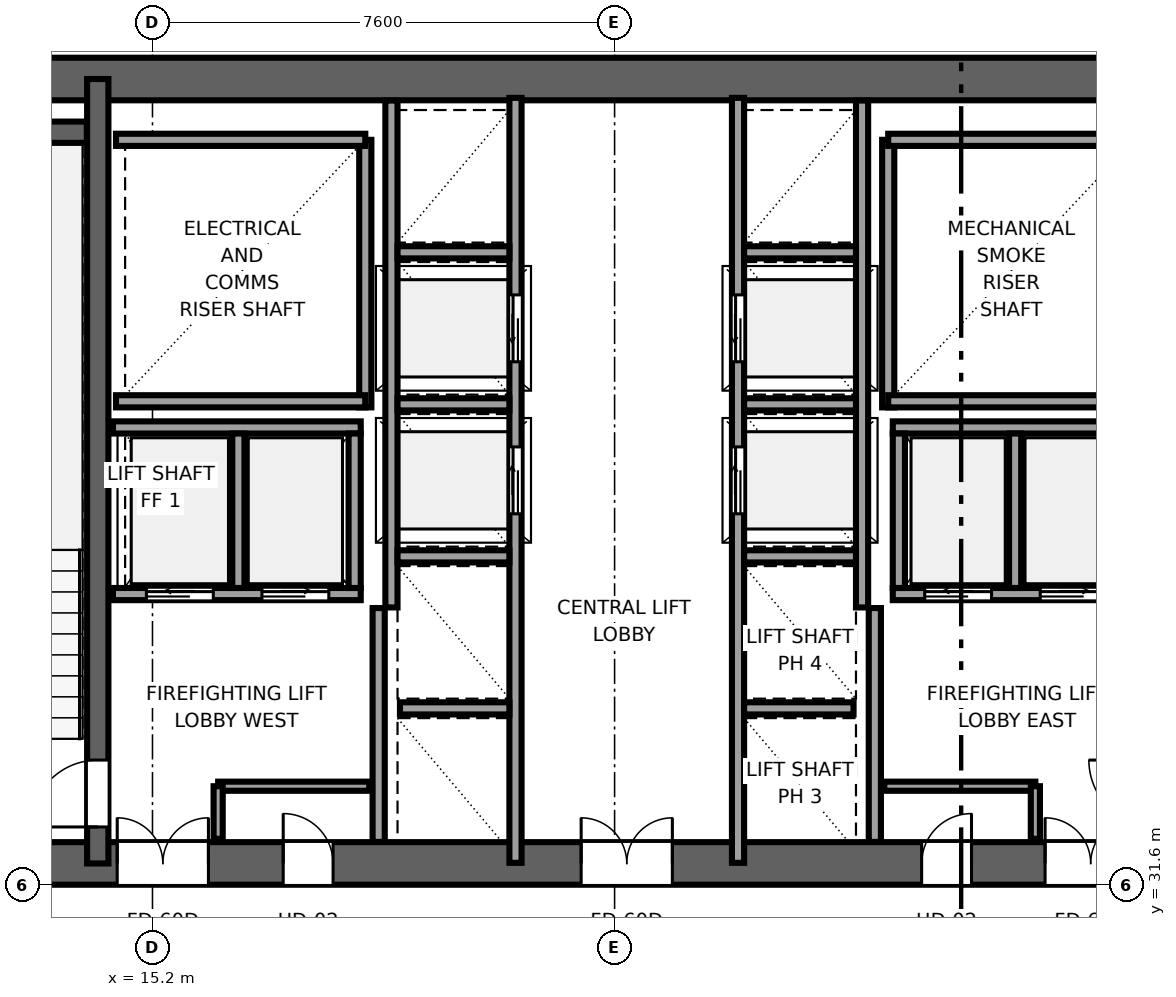
"""IFC4 building model, lengths in metres.
Left out: names, types, materials, properties, quantities, classifications, styles, units other than length and angle.
Written with IfcOpenShell. Run it as: python <this file> out.ifc"""

import sys

from ifc_helpers import new_model, si_unit, direction, frame, frame_2d, origin, place, context, subcontext, project, spatial, rectangle, extrude, source, transform, mapped, element, fill, save


model = new_model("IFC4")
c1 = context("Model", 3, precision=1e-05, world=origin(), true_north=direction((0.0, 1.0)))
c2 = subcontext(c1, "Body", "Model", "MODEL_VIEW")
j1 = project(units=[si_unit("LENGTHUNIT", "METRE"), si_unit("PLANEANGLEUNIT", "RADIAN")], contexts=[c1])
p1 = place(None, origin())
s1 = spatial("IfcSite", under=j1, at=p1, CompositionType="ELEMENT")
p2 = place(p1, origin())
s2 = spatial("IfcBuilding", under=s1, at=p2, CompositionType="ELEMENT")
p3 = place(p2, frame((0.0, 0.0, 125.75)))
s3 = spatial("IfcBuildingStorey", under=s2, at=p3, CompositionType="ELEMENT", Elevation=125.75)
p4 = place(p3, frame((9.8, 31.95, 0.0), z_axis=(0.0, 0.0, 1.0), x_axis=(1.0, 0.0, 0.0)))
e1 = element("IfcWall", 1, at=p4, inside=s3, PredefinedType="SHEAR", context=c2, shape_type="SweptSolid", body=[
    extrude(rectangle(XDim=26.4, YDim=0.7, at=frame_2d((13.2, 0.0))), origin(), (0.0, 0.0, 1.0), 3.55),
])
p5 = place(p4, frame((6.32, 0.0, 0.0), z_axis=(0.0, 0.0, 1.0), x_axis=(-1.0, 0.0, 0.0)))
e2 = element("IfcOpeningElement", 2, at=p5, cuts=e1, PredefinedType="OPENING", context=c2, shape_type="SweptSolid", body=[
    extrude(rectangle(XDim=1.5, YDim=2.04, at=frame_2d((0.75, 1.02))), frame((0.0, 0.36, 0.0), z_axis=(0.0, -1.0, 0.0), x_axis=(1.0, 0.0, 0.0)), (0.0, 0.0, 1.0), 0.72),
])
p6 = place(p4, frame((13.95, 0.0, 0.0), z_axis=(0.0, 0.0, 1.0), x_axis=(-1.0, 0.0, 0.0)))
e3 = element("IfcOpeningElement", 3, at=p6, cuts=e1, PredefinedType="OPENING", context=c2, shape_type="SweptSolid", body=[
    extrude(rectangle(XDim=1.5, YDim=2.04, at=frame_2d((0.75, 1.02))), frame((0.0, 0.36, 0.0), z_axis=(0.0, -1.0, 0.0), x_axis=(1.0, 0.0, 0.0)), (0.0, 0.0, 1.0), 0.72),
])
p7 = place(p4, frame((21.58, 0.0, 0.0), z_axis=(0.0, 0.0, 1.0), x_axis=(-1.0, 0.0, 0.0)))
e4 = element("IfcOpeningElement", 4, at=p7, cuts=e1, PredefinedType="OPENING", context=c2, shape_type="SweptSolid", body=[
    extrude(rectangle(XDim=1.5, YDim=2.04, at=frame_2d((0.75, 1.02))), frame((0.0, 0.36, 0.0), z_axis=(0.0, -1.0, 0.0), x_axis=(1.0, 0.0, 0.0)), (0.0, 0.0, 1.0), 0.72),
])
p8 = place(p4, frame((8.37, 0.0, 0.0), z_axis=(0.0, 0.0, 1.0), x_axis=(-1.0, 0.0, 0.0)))
e5 = element("IfcOpeningElement", 5, at=p8, cuts=e1, PredefinedType="OPENING", context=c2, shape_type="SweptSolid", body=[
    extrude(rectangle(XDim=0.82, YDim=2.01, at=frame_2d((0.41, 1.005))), frame((0.0, 0.36, 0.0), z_axis=(0.0, -1.0, 0.0), x_axis=(1.0, 0.0, 0.0)), (0.0, 0.0, 1.0), 0.72),
])
p9 = place(p4, frame((18.87, 0.0, 0.0), z_axis=(0.0, 0.0, 1.0), x_axis=(-1.0, 0.0, 0.0)))
e6 = element("IfcOpeningElement", 6, at=p9, cuts=e1, PredefinedType="OPENING", context=c2, shape_type="SweptSolid", body=[
    extrude(rectangle(XDim=0.82, YDim=2.01, at=frame_2d((0.41, 1.005))), frame((0.0, 0.36, 0.0), z_axis=(0.0, -1.0, 0.0), x_axis=(1.0, 0.0, 0.0)), (0.0, 0.0, 1.0), 0.72),
])
p10 = place(p3, frame((9.8, 44.85, 0.0), z_axis=(0.0, 0.0, 1.0), x_axis=(1.0, 0.0, 0.0)))
e7 = element("IfcWall", 7, at=p10, inside=s3, PredefinedType="SHEAR", context=c2, shape_type="SweptSolid", body=[
    extrude(rectangle(XDim=26.4, YDim=0.7, at=frame_2d((13.2, 0.0))), origin(), (0.0, 0.0, 1.0), 3.55),
])
p11 = place(p3, frame((14.3, 31.95, 0.0), z_axis=(0.0, 0.0, 1.0), x_axis=(0.0, 1.0, 0.0)))
e8 = element("IfcWall", 8, at=p11, inside=s3, PredefinedType="SHEAR", context=c2, shape_type="SweptSolid", body=[
    extrude(rectangle(XDim=12.9, YDim=0.35, at=frame_2d((6.45, 0.0))), origin(), (0.0, 0.0, 1.0), 3.55),
])
p12 = place(p11, frame((0.6, 0.0, 0.0)))
e9 = element("IfcOpeningElement", 9, at=p12, cuts=e8, PredefinedType="OPENING", context=c2, shape_type="SweptSolid", body=[
    extrude(rectangle(XDim=1.1, YDim=2.12, at=frame_2d((0.55, 1.06))), frame((0.0, 0.185, 0.0), z_axis=(0.0, -1.0, 0.0), x_axis=(1.0, 0.0, 0.0)), (0.0, 0.0, 1.0), 0.37),
])
p13 = place(p3, frame((10.52, 43.975, 0.0), z_axis=(0.0, 0.0, 1.0), x_axis=(1.0, 0.0, 0.0)))
e10 = element("IfcWall", 10, at=p13, inside=s3, PredefinedType="SHEAR", context=c2, shape_type="SweptSolid", body=[
    extrude(rectangle(XDim=3.6, YDim=0.35, at=frame_2d((1.8, 0.0))), origin(), (0.0, 0.0, 1.0), 3.55),
])
p14 = place(p3, frame((18.7, 39.45, 0.0), z_axis=(0.0, 0.0, 1.0), x_axis=(0.0, 1.0, 0.0)))
e11 = element("IfcWall", 11, at=p14, inside=s3, PredefinedType="SOLIDWALL", context=c2, shape_type="SweptSolid", body=[
    extrude(rectangle(XDim=4.4, YDim=0.2, at=frame_2d((2.2, 0.0))), origin(), (0.0, 0.0, 1.0), 3.37),
])
for number, where, z_axis, x_axis in (
    (12, (14.6, 39.55, 0.0), (0.0, 0.0, 1.0), (1.0, 0.0, 0.0)),
    (13, (14.6, 43.85, 0.0), (0.0, 0.0, 1.0), (1.0, 0.0, 0.0)),
):
    element("IfcWall", number, at=place(p3, frame(where, z_axis=z_axis, x_axis=x_axis)), inside=s3, PredefinedType="SOLIDWALL", context=c2, shape_type="SweptSolid", body=[
        extrude(rectangle(XDim=4.1, YDim=0.2, at=frame_2d((2.05, 0.0))), origin(), (0.0, 0.0, 1.0), 3.37),
    ])
p15 = place(p3, frame((27.3, 39.45, 0.0), z_axis=(0.0, 0.0, 1.0), x_axis=(0.0, 1.0, 0.0)))
e14 = element("IfcWall", 14, at=p15, inside=s3, PredefinedType="SOLIDWALL", context=c2, shape_type="SweptSolid", body=[
    extrude(rectangle(XDim=4.4, YDim=0.2, at=frame_2d((2.2, 0.0))), origin(), (0.0, 0.0, 1.0), 3.37),
])
for number, where, z_axis, x_axis in (
    (15, (27.3, 39.55, 0.0), (0.0, 0.0, 1.0), (1.0, 0.0, 0.0)),
    (16, (27.3, 43.85, 0.0), (0.0, 0.0, 1.0), (1.0, 0.0, 0.0)),
):
    element("IfcWall", number, at=place(p3, frame(where, z_axis=z_axis, x_axis=x_axis)), inside=s3, PredefinedType="SOLIDWALL", context=c2, shape_type="SweptSolid", body=[
        extrude(rectangle(XDim=4.1, YDim=0.2, at=frame_2d((2.05, 0.0))), origin(), (0.0, 0.0, 1.0), 3.37),
    ])
for number, where, z_axis, x_axis in (
    (17, (18.92, 32.304, 0.0), (0.0, 0.0, 1.0), (0.0, 1.0, 0.0)),
    (18, (27.08, 32.304, 0.0), (0.0, 0.0, 1.0), (0.0, 1.0, 0.0)),
):
    element("IfcWall", number, at=place(p3, frame(where, z_axis=z_axis, x_axis=x_axis)), inside=s3, PredefinedType="SOLIDWALL", context=c2, shape_type="SweptSolid", body=[
        extrude(rectangle(XDim=3.846, YDim=0.2, at=frame_2d((1.923, 0.0))), origin(), (0.0, 0.0, 1.0), 3.37),
    ])
p16 = place(p3, frame((21.17, 31.96, 0.0), z_axis=(0.0, 0.0, 1.0), x_axis=(0.0, 1.0, 0.0)))
e19 = element("IfcWall", 19, at=p16, inside=s3, PredefinedType="SOLIDWALL", context=c2, shape_type="SweptSolid", body=[
    extrude(rectangle(XDim=12.58, YDim=0.2, at=frame_2d((6.29, 0.0))), origin(), (0.0, 0.0, 1.0), 3.37),
])
p17 = place(p16, frame((5.74, 0.0, 0.0)))
e20 = element("IfcOpeningElement", 20, at=p17, cuts=e19, PredefinedType="OPENING", context=c2, shape_type="SweptSolid", body=[
    extrude(rectangle(XDim=1.1, YDim=2.12, at=frame_2d((0.55, 1.06))), frame((0.0, 0.11, 0.0), z_axis=(0.0, -1.0, 0.0), x_axis=(1.0, 0.0, 0.0)), (0.0, 0.0, 1.0), 0.22),
])
p18 = place(p16, frame((8.24, 0.0, 0.0)))
e21 = element("IfcOpeningElement", 21, at=p18, cuts=e19, PredefinedType="OPENING", context=c2, shape_type="SweptSolid", body=[
    extrude(rectangle(XDim=1.1, YDim=2.12, at=frame_2d((0.55, 1.06))), frame((0.0, 0.11, 0.0), z_axis=(0.0, -1.0, 0.0), x_axis=(1.0, 0.0, 0.0)), (0.0, 0.0, 1.0), 0.22),
])
p19 = place(p3, frame((19.13, 36.16, 0.0), z_axis=(0.0, 0.0, 1.0), x_axis=(0.0, 1.0, 0.0)))
e22 = element("IfcWall", 22, at=p19, inside=s3, PredefinedType="SOLIDWALL", context=c2, shape_type="SweptSolid", body=[
    extrude(rectangle(XDim=8.336, YDim=0.2, at=frame_2d((4.168, 0.0))), origin(), (0.0, 0.0, 1.0), 3.37),
])
p20 = place(p3, frame((19.27, 34.5, 0.0), z_axis=(0.0, 0.0, 1.0), x_axis=(1.0, 0.0, 0.0)))
e23 = element("IfcWall", 23, at=p20, inside=s3, PredefinedType="SOLIDWALL", context=c2, shape_type="SweptSolid", body=[
    extrude(rectangle(XDim=1.8, YDim=0.2, at=frame_2d((0.9, 0.0))), origin(), (0.0, 0.0, 1.0), 3.37),
])
for number, where, z_axis, x_axis in (
    (24, (19.23, 37.0, 0.0), (0.0, 0.0, 1.0), (1.0, 0.0, 0.0)),
    (25, (19.23, 39.5, 0.0), (0.0, 0.0, 1.0), (1.0, 0.0, 0.0)),
    (26, (19.23, 42.0, 0.0), (0.0, 0.0, 1.0), (1.0, 0.0, 0.0)),
):
    element("IfcWall", number, at=place(p3, frame(where, z_axis=z_axis, x_axis=x_axis)), inside=s3, PredefinedType="SOLIDWALL", context=c2, shape_type="SweptSolid", body=[
        extrude(rectangle(XDim=1.84, YDim=0.2, at=frame_2d((0.92, 0.0))), origin(), (0.0, 0.0, 1.0), 3.37),
    ])
p21 = place(p3, frame((27.375, 36.38, 0.0), z_axis=(0.0, 0.0, 1.0), x_axis=(1.0, 0.0, 0.0)))
e27 = element("IfcWall", 27, at=p21, inside=s3, PredefinedType="SOLIDWALL", context=c2, shape_type="SweptSolid", body=[
    extrude(rectangle(XDim=4.075, YDim=0.2, at=frame_2d((2.038, 0.0))), origin(), (0.0, 0.0, 1.0), 3.37),
])
p22 = place(p21, frame((0.525, 0.0, 0.0)))
e28 = element("IfcOpeningElement", 28, at=p22, cuts=e27, PredefinedType="OPENING", context=c2, shape_type="SweptSolid", body=[
    extrude(rectangle(XDim=1.1, YDim=2.12, at=frame_2d((0.55, 1.06))), frame((0.0, 0.11, 0.0), z_axis=(0.0, -1.0, 0.0), x_axis=(1.0, 0.0, 0.0)), (0.0, 0.0, 1.0), 0.22),
])
p23 = place(p21, frame((2.425, 0.0, 0.0)))
e29 = element("IfcOpeningElement", 29, at=p23, cuts=e27, PredefinedType="OPENING", context=c2, shape_type="SweptSolid", body=[
    extrude(rectangle(XDim=1.1, YDim=2.12, at=frame_2d((0.55, 1.06))), frame((0.0, 0.11, 0.0), z_axis=(0.0, -1.0, 0.0), x_axis=(1.0, 0.0, 0.0)), (0.0, 0.0, 1.0), 0.22),
])
p24 = place(p3, frame((27.375, 39.12, 0.0), z_axis=(0.0, 0.0, 1.0), x_axis=(1.0, 0.0, 0.0)))
e30 = element("IfcWall", 30, at=p24, inside=s3, PredefinedType="SOLIDWALL", context=c2, shape_type="SweptSolid", body=[
    extrude(rectangle(XDim=4.075, YDim=0.2, at=frame_2d((2.038, 0.0))), origin(), (0.0, 0.0, 1.0), 3.37),
])
for number, where, z_axis, x_axis in (
    (31, (27.475, 36.48, 0.0), (0.0, 0.0, 1.0), (0.0, 1.0, 0.0)),
    (32, (29.387, 36.48, 0.0), (0.0, 0.0, 1.0), (0.0, 1.0, 0.0)),
):
    element("IfcWall", number, at=place(p3, frame(where, z_axis=z_axis, x_axis=x_axis)), inside=s3, PredefinedType="SOLIDWALL", context=c2, shape_type="SweptSolid", body=[
        extrude(rectangle(XDim=2.54, YDim=0.2, at=frame_2d((1.27, 0.0))), origin(), (0.0, 0.0, 1.0), 3.37),
    ])
p25 = place(p3, frame((14.55, 36.38, 0.0), z_axis=(0.0, 0.0, 1.0), x_axis=(1.0, 0.0, 0.0)))
e33 = element("IfcWall", 33, at=p25, inside=s3, PredefinedType="SOLIDWALL", context=c2, shape_type="SweptSolid", body=[
    extrude(rectangle(XDim=4.075, YDim=0.2, at=frame_2d((2.038, 0.0))), origin(), (0.0, 0.0, 1.0), 3.37),
])
p26 = place(p25, frame((0.55, 0.0, 0.0)))
e34 = element("IfcOpeningElement", 34, at=p26, cuts=e33, PredefinedType="OPENING", context=c2, shape_type="SweptSolid", body=[
    extrude(rectangle(XDim=1.1, YDim=2.12, at=frame_2d((0.55, 1.06))), frame((0.0, 0.11, 0.0), z_axis=(0.0, -1.0, 0.0), x_axis=(1.0, 0.0, 0.0)), (0.0, 0.0, 1.0), 0.22),
])
p27 = place(p25, frame((2.45, 0.0, 0.0)))
e35 = element("IfcOpeningElement", 35, at=p27, cuts=e33, PredefinedType="OPENING", context=c2, shape_type="SweptSolid", body=[
    extrude(rectangle(XDim=1.1, YDim=2.12, at=frame_2d((0.55, 1.06))), frame((0.0, 0.11, 0.0), z_axis=(0.0, -1.0, 0.0), x_axis=(1.0, 0.0, 0.0)), (0.0, 0.0, 1.0), 0.22),
])
p28 = place(p3, frame((14.55, 39.12, 0.0), z_axis=(0.0, 0.0, 1.0), x_axis=(1.0, 0.0, 0.0)))
e36 = element("IfcWall", 36, at=p28, inside=s3, PredefinedType="SOLIDWALL", context=c2, shape_type="SweptSolid", body=[
    extrude(rectangle(XDim=4.075, YDim=0.2, at=frame_2d((2.038, 0.0))), origin(), (0.0, 0.0, 1.0), 3.37),
])
for number, where, z_axis, x_axis in (
    (37, (18.525, 36.48, 0.0), (0.0, 0.0, 1.0), (0.0, 1.0, 0.0)),
    (38, (16.613, 36.48, 0.0), (0.0, 0.0, 1.0), (0.0, 1.0, 0.0)),
):
    element("IfcWall", number, at=place(p3, frame(where, z_axis=z_axis, x_axis=x_axis)), inside=s3, PredefinedType="SOLIDWALL", context=c2, shape_type="SweptSolid", body=[
        extrude(rectangle(XDim=2.54, YDim=0.2, at=frame_2d((1.27, 0.0))), origin(), (0.0, 0.0, 1.0), 3.37),
    ])
p29 = place(p3, frame((24.83, 31.96, 0.0), z_axis=(0.0, 0.0, 1.0), x_axis=(0.0, 1.0, 0.0)))
e39 = element("IfcWall", 39, at=p29, inside=s3, PredefinedType="SOLIDWALL", context=c2, shape_type="SweptSolid", body=[
    extrude(rectangle(XDim=12.58, YDim=0.2, at=frame_2d((6.29, 0.0))), origin(), (0.0, 0.0, 1.0), 3.37),
])
p30 = place(p29, frame((5.74, 0.0, 0.0)))
e40 = element("IfcOpeningElement", 40, at=p30, cuts=e39, PredefinedType="OPENING", context=c2, shape_type="SweptSolid", body=[
    extrude(rectangle(XDim=1.1, YDim=2.12, at=frame_2d((0.55, 1.06))), frame((0.0, 0.11, 0.0), z_axis=(0.0, -1.0, 0.0), x_axis=(1.0, 0.0, 0.0)), (0.0, 0.0, 1.0), 0.22),
])
p31 = place(p29, frame((8.24, 0.0, 0.0)))
e41 = element("IfcOpeningElement", 41, at=p31, cuts=e39, PredefinedType="OPENING", context=c2, shape_type="SweptSolid", body=[
    extrude(rectangle(XDim=1.1, YDim=2.12, at=frame_2d((0.55, 1.06))), frame((0.0, 0.11, 0.0), z_axis=(0.0, -1.0, 0.0), x_axis=(1.0, 0.0, 0.0)), (0.0, 0.0, 1.0), 0.22),
])
p32 = place(p3, frame((26.87, 36.16, 0.0), z_axis=(0.0, 0.0, 1.0), x_axis=(0.0, 1.0, 0.0)))
e42 = element("IfcWall", 42, at=p32, inside=s3, PredefinedType="SOLIDWALL", context=c2, shape_type="SweptSolid", body=[
    extrude(rectangle(XDim=8.336, YDim=0.2, at=frame_2d((4.168, 0.0))), origin(), (0.0, 0.0, 1.0), 3.37),
])
p33 = place(p3, frame((24.93, 34.5, 0.0), z_axis=(0.0, 0.0, 1.0), x_axis=(1.0, 0.0, 0.0)))
e43 = element("IfcWall", 43, at=p33, inside=s3, PredefinedType="SOLIDWALL", context=c2, shape_type="SweptSolid", body=[
    extrude(rectangle(XDim=1.8, YDim=0.2, at=frame_2d((0.9, 0.0))), origin(), (0.0, 0.0, 1.0), 3.37),
])
for number, where, z_axis, x_axis in (
    (44, (24.93, 37.0, 0.0), (0.0, 0.0, 1.0), (1.0, 0.0, 0.0)),
    (45, (24.93, 39.5, 0.0), (0.0, 0.0, 1.0), (1.0, 0.0, 0.0)),
    (46, (24.93, 42.0, 0.0), (0.0, 0.0, 1.0), (1.0, 0.0, 0.0)),
):
    element("IfcWall", number, at=place(p3, frame(where, z_axis=z_axis, x_axis=x_axis)), inside=s3, PredefinedType="SOLIDWALL", context=c2, shape_type="SweptSolid", body=[
        extrude(rectangle(XDim=1.84, YDim=0.2, at=frame_2d((0.92, 0.0))), origin(), (0.0, 0.0, 1.0), 3.37),
    ])
p34 = place(p3, frame((16.28, 33.22, 0.0), z_axis=(0.0, 0.0, 1.0), x_axis=(1.0, 0.0, 0.0)))
e47 = element("IfcWall", 47, at=p34, inside=s3, PredefinedType="PARTITIONING", context=c2, shape_type="SweptSolid", body=[
    extrude(rectangle(XDim=2.485, YDim=0.15, at=frame_2d((1.242, 0.0))), origin(), (0.0, 0.0, 1.0), 3.37),
])
p35 = place(p3, frame((16.28, 32.355, 0.0), z_axis=(0.0, 0.0, 1.0), x_axis=(0.0, 1.0, 0.0)))
e48 = element("IfcWall", 48, at=p35, inside=s3, PredefinedType="PARTITIONING", context=c2, shape_type="SweptSolid", body=[
    extrude(rectangle(XDim=0.865, YDim=0.15, at=frame_2d((0.433, 0.0))), origin(), (0.0, 0.0, 1.0), 3.37),
])
p36 = place(p3, frame((27.235, 33.22, 0.0), z_axis=(0.0, 0.0, 1.0), x_axis=(1.0, 0.0, 0.0)))
e49 = element("IfcWall", 49, at=p36, inside=s3, PredefinedType="PARTITIONING", context=c2, shape_type="SweptSolid", body=[
    extrude(rectangle(XDim=2.485, YDim=0.15, at=frame_2d((1.242, 0.0))), origin(), (0.0, 0.0, 1.0), 3.37),
])
p37 = place(p3, frame((29.72, 32.355, 0.0), z_axis=(0.0, 0.0, 1.0), x_axis=(0.0, 1.0, 0.0)))
e50 = element("IfcWall", 50, at=p37, inside=s3, PredefinedType="PARTITIONING", context=c2, shape_type="SweptSolid", body=[
    extrude(rectangle(XDim=0.865, YDim=0.15, at=frame_2d((0.433, 0.0))), origin(), (0.0, 0.0, 1.0), 3.37),
])
m1 = source(origin(), c2, "Body", "SweptSolid", [
    extrude(rectangle(XDim=1.1, YDim=2.12, at=frame_2d((0.55, 1.06))), frame((0.0, 0.025, 0.0), z_axis=(0.0, -1.0, 0.0), x_axis=(1.0, 0.0, 0.0)), (0.0, 0.0, 1.0), 0.05),
])
p38 = place(p12, origin())
e51 = element("IfcDoor", 51, at=p38, inside=s3, OperationType="SINGLE_SWING_LEFT", PredefinedType="DOOR", context=c2, shape_type="MappedRepresentation", body=[
    mapped(m1, transform((0.0, 0.0, 0.0), x_axis=(1.0, 0.0, 0.0), y_axis=(0.0, 1.0, 0.0), z_axis=(0.0, 0.0, 1.0), scale=1.0)),
])
fill(e9, e51)
m2 = source(origin(), c2, "Body", "SweptSolid", [
    extrude(rectangle(XDim=1.5, YDim=2.04, at=frame_2d((0.75, 1.02))), frame((0.0, 0.025, 0.0), z_axis=(0.0, -1.0, 0.0), x_axis=(1.0, 0.0, 0.0)), (0.0, 0.0, 1.0), 0.05),
])
p39 = place(p5, origin())
e52 = element("IfcDoor", 52, at=p39, inside=s3, OperationType="DOUBLE_DOOR_SINGLE_SWING", PredefinedType="DOOR", context=c2, shape_type="MappedRepresentation", body=[
    mapped(m2, transform((0.0, 0.0, 0.0), x_axis=(1.0, 0.0, 0.0), y_axis=(0.0, 1.0, 0.0), z_axis=(0.0, 0.0, 1.0), scale=1.0)),
])
fill(e2, e52)
p40 = place(p6, origin())
e53 = element("IfcDoor", 53, at=p40, inside=s3, OperationType="DOUBLE_DOOR_SINGLE_SWING", PredefinedType="DOOR", context=c2, shape_type="MappedRepresentation", body=[
    mapped(m2, transform((0.0, 0.0, 0.0), x_axis=(1.0, 0.0, 0.0), y_axis=(0.0, 1.0, 0.0), z_axis=(0.0, 0.0, 1.0), scale=1.0)),
])
fill(e3, e53)
p41 = place(p7, origin())
e54 = element("IfcDoor", 54, at=p41, inside=s3, OperationType="DOUBLE_DOOR_SINGLE_SWING", PredefinedType="DOOR", context=c2, shape_type="MappedRepresentation", body=[
    mapped(m2, transform((0.0, 0.0, 0.0), x_axis=(1.0, 0.0, 0.0), y_axis=(0.0, 1.0, 0.0), z_axis=(0.0, 0.0, 1.0), scale=1.0)),
])
fill(e4, e54)
m3 = source(origin(), c2, "Body", "SweptSolid", [
    extrude(rectangle(XDim=0.82, YDim=2.01, at=frame_2d((0.41, 1.005))), frame((0.0, 0.025, 0.0), z_axis=(0.0, -1.0, 0.0), x_axis=(1.0, 0.0, 0.0)), (0.0, 0.0, 1.0), 0.05),
])
p42 = place(p8, origin())
e55 = element("IfcDoor", 55, at=p42, inside=s3, OperationType="SINGLE_SWING_LEFT", PredefinedType="DOOR", context=c2, shape_type="MappedRepresentation", body=[
    mapped(m3, transform((0.0, 0.0, 0.0), x_axis=(1.0, 0.0, 0.0), y_axis=(0.0, 1.0, 0.0), z_axis=(0.0, 0.0, 1.0), scale=1.0)),
])
fill(e5, e55)
p43 = place(p9, origin())
e56 = element("IfcDoor", 56, at=p43, inside=s3, OperationType="SINGLE_SWING_RIGHT", PredefinedType="DOOR", context=c2, shape_type="MappedRepresentation", body=[
    mapped(m3, transform((0.0, 0.0, 0.0), x_axis=(1.0, 0.0, 0.0), y_axis=(0.0, 1.0, 0.0), z_axis=(0.0, 0.0, 1.0), scale=1.0)),
])
fill(e6, e56)
m4 = source(origin(), c2, "Body", "SweptSolid", [
    extrude(rectangle(XDim=1.1, YDim=2.12, at=frame_2d((0.55, 1.06))), frame((0.0, 0.025, 0.0), z_axis=(0.0, -1.0, 0.0), x_axis=(1.0, 0.0, 0.0)), (0.0, 0.0, 1.0), 0.05),
])
p44 = place(p17, origin())
e57 = element("IfcDoor", 57, at=p44, inside=s3, OperationType="SLIDING_TO_RIGHT", PredefinedType="DOOR", context=c2, shape_type="MappedRepresentation", body=[
    mapped(m4, transform((0.0, 0.0, 0.0), x_axis=(1.0, 0.0, 0.0), y_axis=(0.0, 1.0, 0.0), z_axis=(0.0, 0.0, 1.0), scale=1.0)),
])
fill(e20, e57)
p45 = place(p18, origin())
e58 = element("IfcDoor", 58, at=p45, inside=s3, OperationType="SLIDING_TO_LEFT", PredefinedType="DOOR", context=c2, shape_type="MappedRepresentation", body=[
    mapped(m4, transform((0.0, 0.0, 0.0), x_axis=(1.0, 0.0, 0.0), y_axis=(0.0, 1.0, 0.0), z_axis=(0.0, 0.0, 1.0), scale=1.0)),
])
fill(e21, e58)
p46 = place(p22, origin())
e59 = element("IfcDoor", 59, at=p46, inside=s3, OperationType="SLIDING_TO_LEFT", PredefinedType="DOOR", context=c2, shape_type="MappedRepresentation", body=[
    mapped(m4, transform((0.0, 0.0, 0.0), x_axis=(1.0, 0.0, 0.0), y_axis=(0.0, 1.0, 0.0), z_axis=(0.0, 0.0, 1.0), scale=1.0)),
])
fill(e28, e59)
p47 = place(p23, origin())
e60 = element("IfcDoor", 60, at=p47, inside=s3, OperationType="SLIDING_TO_RIGHT", PredefinedType="DOOR", context=c2, shape_type="MappedRepresentation", body=[
    mapped(m4, transform((0.0, 0.0, 0.0), x_axis=(1.0, 0.0, 0.0), y_axis=(0.0, 1.0, 0.0), z_axis=(0.0, 0.0, 1.0), scale=1.0)),
])
fill(e29, e60)
p48 = place(p26, origin())
e61 = element("IfcDoor", 61, at=p48, inside=s3, OperationType="SLIDING_TO_LEFT", PredefinedType="DOOR", context=c2, shape_type="MappedRepresentation", body=[
    mapped(m4, transform((0.0, 0.0, 0.0), x_axis=(1.0, 0.0, 0.0), y_axis=(0.0, 1.0, 0.0), z_axis=(0.0, 0.0, 1.0), scale=1.0)),
])
fill(e34, e61)
p49 = place(p27, origin())
e62 = element("IfcDoor", 62, at=p49, inside=s3, OperationType="SLIDING_TO_RIGHT", PredefinedType="DOOR", context=c2, shape_type="MappedRepresentation", body=[
    mapped(m4, transform((0.0, 0.0, 0.0), x_axis=(1.0, 0.0, 0.0), y_axis=(0.0, 1.0, 0.0), z_axis=(0.0, 0.0, 1.0), scale=1.0)),
])
fill(e35, e62)
p50 = place(p30, origin())
e63 = element("IfcDoor", 63, at=p50, inside=s3, OperationType="SLIDING_TO_RIGHT", PredefinedType="DOOR", context=c2, shape_type="MappedRepresentation", body=[
    mapped(m4, transform((0.0, 0.0, 0.0), x_axis=(1.0, 0.0, 0.0), y_axis=(0.0, 1.0, 0.0), z_axis=(0.0, 0.0, 1.0), scale=1.0)),
])
fill(e40, e63)
p51 = place(p31, origin())
e64 = element("IfcDoor", 64, at=p51, inside=s3, OperationType="SLIDING_TO_LEFT", PredefinedType="DOOR", context=c2, shape_type="MappedRepresentation", body=[
    mapped(m4, transform((0.0, 0.0, 0.0), x_axis=(1.0, 0.0, 0.0), y_axis=(0.0, 1.0, 0.0), z_axis=(0.0, 0.0, 1.0), scale=1.0)),
])
fill(e41, e64)
save(model, sys.argv[1])
